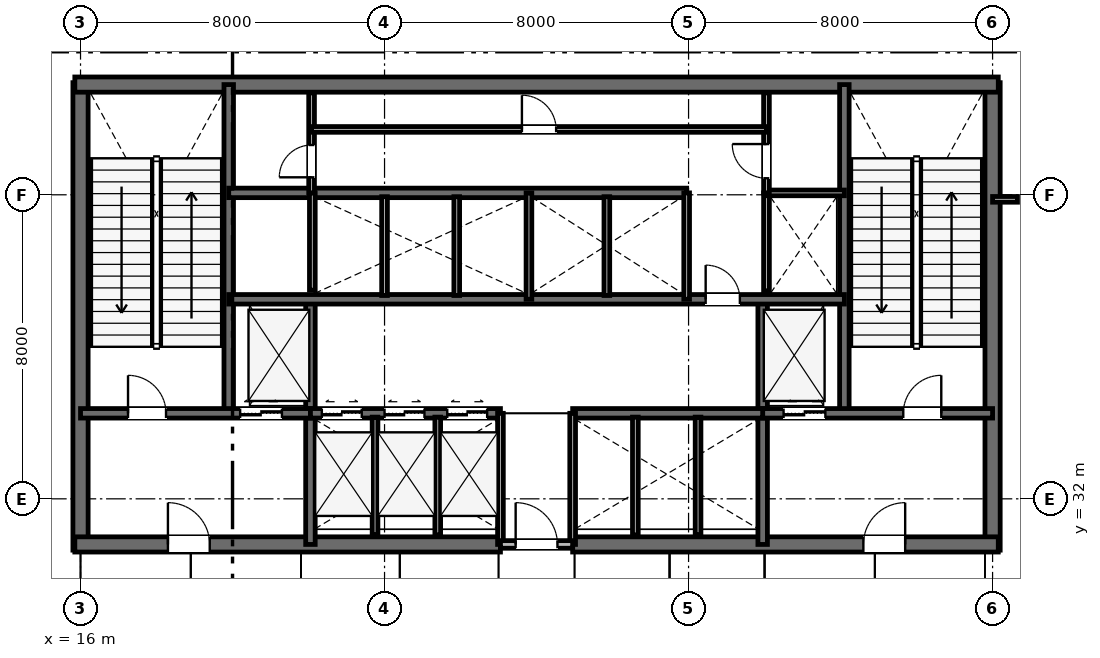
"""IFC4 building model, lengths in metres.
Left out: names, types, materials, properties, quantities, classifications, styles, units other than length and angle.
Written with IfcOpenShell. Run it as: python <this file> out.ifc"""

import sys

from ifc_helpers import new_model, si_unit, direction, frame, frame_2d, origin, place, context, subcontext, project, spatial, rectangle, extrude, element, fill, save


model = new_model("IFC4")
c1 = context("Model", 3, precision=1e-05, world=origin(), true_north=direction((0.0, 1.0)))
c2 = subcontext(c1, "Body", "Model", "MODEL_VIEW")
j1 = project(units=[si_unit("LENGTHUNIT", "METRE"), si_unit("PLANEANGLEUNIT", "RADIAN")], contexts=[c1])
p1 = place(None, origin())
s1 = spatial("IfcSite", under=j1, at=p1, CompositionType="ELEMENT")
p2 = place(p1, origin())
s2 = spatial("IfcBuilding", under=s1, at=p2, CompositionType="ELEMENT")
p3 = place(p2, frame((0.0, 0.0, 15.9)))
s3 = spatial("IfcBuildingStorey", under=s2, at=p3, CompositionType="ELEMENT", Elevation=15.9)
for number, where, z_axis, x_axis in (
    (1, (16.0, 30.65, 0.0), (0.0, 0.0, 1.0), (0.0, 1.0, 0.0)),
    (2, (40.0, 30.65, 0.0), (0.0, 0.0, 1.0), (0.0, 1.0, 0.0)),
):
    element("IfcWall", number, at=place(p3, frame(where, z_axis=z_axis, x_axis=x_axis)), inside=s3, PredefinedType="SHEAR", context=c2, shape_type="SweptSolid", body=[
        extrude(rectangle(XDim=12.3, YDim=0.4, at=frame_2d((6.15, 0.0))), origin(), (0.0, 0.0, 1.0), 5.4),
    ])
p4 = place(p3, frame((15.85, 42.9, 0.0), z_axis=(0.0, 0.0, 1.0), x_axis=(1.0, 0.0, 0.0)))
e3 = element("IfcWall", 3, at=p4, inside=s3, PredefinedType="SHEAR", context=c2, shape_type="SweptSolid", body=[
    extrude(rectangle(XDim=24.3, YDim=0.4, at=frame_2d((12.15, 0.0))), origin(), (0.0, 0.0, 1.0), 5.4),
])
p5 = place(p3, frame((15.85, 30.8, 0.0), z_axis=(0.0, 0.0, 1.0), x_axis=(1.0, 0.0, 0.0)))
e4 = element("IfcWall", 4, at=p5, inside=s3, PredefinedType="SHEAR", context=c2, shape_type="SweptSolid", body=[
    extrude(rectangle(XDim=11.2, YDim=0.4, at=frame_2d((5.6, 0.0))), origin(), (0.0, 0.0, 1.0), 5.4),
])
p6 = place(p5, frame((2.45, 0.0, 0.0)))
e5 = element("IfcOpeningElement", 5, at=p6, cuts=e4, PredefinedType="OPENING", context=c2, shape_type="SweptSolid", body=[
    extrude(rectangle(XDim=1.1, YDim=2.15, at=frame_2d((0.55, 1.075))), frame((0.0, 0.21, 0.0), z_axis=(0.0, -1.0, 0.0), x_axis=(1.0, 0.0, 0.0)), (0.0, 0.0, 1.0), 0.42),
])
p7 = place(p3, frame((28.95, 30.8, 0.0), z_axis=(0.0, 0.0, 1.0), x_axis=(1.0, 0.0, 0.0)))
e6 = element("IfcWall", 6, at=p7, inside=s3, PredefinedType="SHEAR", context=c2, shape_type="SweptSolid", body=[
    extrude(rectangle(XDim=11.2, YDim=0.4, at=frame_2d((5.6, 0.0))), origin(), (0.0, 0.0, 1.0), 5.4),
])
p8 = place(p7, frame((7.65, 0.0, 0.0)))
e7 = element("IfcOpeningElement", 7, at=p8, cuts=e6, PredefinedType="OPENING", context=c2, shape_type="SweptSolid", body=[
    extrude(rectangle(XDim=1.1, YDim=2.15, at=frame_2d((0.55, 1.075))), frame((0.0, 0.21, 0.0), z_axis=(0.0, -1.0, 0.0), x_axis=(1.0, 0.0, 0.0)), (0.0, 0.0, 1.0), 0.42),
])
for number, where, z_axis, x_axis in (
    (8, (19.9, 34.25, 0.0), (0.0, 0.0, 1.0), (0.0, 1.0, 0.0)),
    (9, (36.1, 34.25, 0.0), (0.0, 0.0, 1.0), (0.0, 1.0, 0.0)),
):
    element("IfcWall", number, at=place(p3, frame(where, z_axis=z_axis, x_axis=x_axis)), inside=s3, PredefinedType="SHEAR", context=c2, shape_type="SweptSolid", body=[
        extrude(rectangle(XDim=8.65, YDim=0.25, at=frame_2d((4.325, 0.0))), origin(), (0.0, 0.0, 1.0), 5.4),
    ])
for number, where, z_axis, x_axis in (
    (10, (22.05, 30.8, 0.0), (0.0, 0.0, 1.0), (0.0, 1.0, 0.0)),
    (11, (33.95, 30.8, 0.0), (0.0, 0.0, 1.0), (0.0, 1.0, 0.0)),
):
    element("IfcWall", number, at=place(p3, frame(where, z_axis=z_axis, x_axis=x_axis)), inside=s3, PredefinedType="SHEAR", context=c2, shape_type="SweptSolid", body=[
        extrude(rectangle(XDim=6.45, YDim=0.25, at=frame_2d((3.225, 0.0))), origin(), (0.0, 0.0, 1.0), 5.4),
    ])
p9 = place(p3, frame((16.0, 34.25, 0.0), z_axis=(0.0, 0.0, 1.0), x_axis=(1.0, 0.0, 0.0)))
e12 = element("IfcWall", 12, at=p9, inside=s3, PredefinedType="SHEAR", context=c2, shape_type="SweptSolid", body=[
    extrude(rectangle(XDim=6.05, YDim=0.25, at=frame_2d((3.025, 0.0))), origin(), (0.0, 0.0, 1.0), 5.4),
])
p10 = place(p9, frame((1.25, 0.0, 0.0)))
e13 = element("IfcOpeningElement", 13, at=p10, cuts=e12, PredefinedType="OPENING", context=c2, shape_type="SweptSolid", body=[
    extrude(rectangle(XDim=1.0, YDim=2.15, at=frame_2d((0.5, 1.075))), frame((0.0, 0.135, 0.0), z_axis=(0.0, -1.0, 0.0), x_axis=(1.0, 0.0, 0.0)), (0.0, 0.0, 1.0), 0.27),
])
p11 = place(p9, frame((4.2, 0.0, 0.0)))
e14 = element("IfcOpeningElement", 14, at=p11, cuts=e12, PredefinedType="OPENING", context=c2, shape_type="SweptSolid", body=[
    extrude(rectangle(XDim=1.1, YDim=2.15, at=frame_2d((0.55, 1.075))), frame((0.0, 0.135, 0.0), z_axis=(0.0, -1.0, 0.0), x_axis=(1.0, 0.0, 0.0)), (0.0, 0.0, 1.0), 0.27),
])
p12 = place(p3, frame((33.95, 34.25, 0.0), z_axis=(0.0, 0.0, 1.0), x_axis=(1.0, 0.0, 0.0)))
e15 = element("IfcWall", 15, at=p12, inside=s3, PredefinedType="SHEAR", context=c2, shape_type="SweptSolid", body=[
    extrude(rectangle(XDim=6.05, YDim=0.25, at=frame_2d((3.025, 0.0))), origin(), (0.0, 0.0, 1.0), 5.4),
])
p13 = place(p12, frame((3.7, 0.0, 0.0)))
e16 = element("IfcOpeningElement", 16, at=p13, cuts=e15, PredefinedType="OPENING", context=c2, shape_type="SweptSolid", body=[
    extrude(rectangle(XDim=1.0, YDim=2.15, at=frame_2d((0.5, 1.075))), frame((0.0, 0.135, 0.0), z_axis=(0.0, -1.0, 0.0), x_axis=(1.0, 0.0, 0.0)), (0.0, 0.0, 1.0), 0.27),
])
p14 = place(p12, frame((0.55, 0.0, 0.0)))
e17 = element("IfcOpeningElement", 17, at=p14, cuts=e15, PredefinedType="OPENING", context=c2, shape_type="SweptSolid", body=[
    extrude(rectangle(XDim=1.1, YDim=2.15, at=frame_2d((0.55, 1.075))), frame((0.0, 0.135, 0.0), z_axis=(0.0, -1.0, 0.0), x_axis=(1.0, 0.0, 0.0)), (0.0, 0.0, 1.0), 0.27),
])
p15 = place(p3, frame((22.05, 34.25, 0.0), z_axis=(0.0, 0.0, 1.0), x_axis=(1.0, 0.0, 0.0)))
e18 = element("IfcWall", 18, at=p15, inside=s3, PredefinedType="SHEAR", context=c2, shape_type="SweptSolid", body=[
    extrude(rectangle(XDim=5.0, YDim=0.25, at=frame_2d((2.5, 0.0))), origin(), (0.0, 0.0, 1.0), 5.4),
])
p16 = place(p15, frame((0.3, 0.0, 0.0)))
e19 = element("IfcOpeningElement", 19, at=p16, cuts=e18, PredefinedType="OPENING", context=c2, shape_type="SweptSolid", body=[
    extrude(rectangle(XDim=1.05, YDim=2.15, at=frame_2d((0.525, 1.075))), frame((0.0, 0.135, 0.0), z_axis=(0.0, -1.0, 0.0), x_axis=(1.0, 0.0, 0.0)), (0.0, 0.0, 1.0), 0.27),
])
p17 = place(p15, frame((1.95, 0.0, 0.0)))
e20 = element("IfcOpeningElement", 20, at=p17, cuts=e18, PredefinedType="OPENING", context=c2, shape_type="SweptSolid", body=[
    extrude(rectangle(XDim=1.05, YDim=2.15, at=frame_2d((0.525, 1.075))), frame((0.0, 0.135, 0.0), z_axis=(0.0, -1.0, 0.0), x_axis=(1.0, 0.0, 0.0)), (0.0, 0.0, 1.0), 0.27),
])
p18 = place(p15, frame((3.6, 0.0, 0.0)))
e21 = element("IfcOpeningElement", 21, at=p18, cuts=e18, PredefinedType="OPENING", context=c2, shape_type="SweptSolid", body=[
    extrude(rectangle(XDim=1.05, YDim=2.15, at=frame_2d((0.525, 1.075))), frame((0.0, 0.135, 0.0), z_axis=(0.0, -1.0, 0.0), x_axis=(1.0, 0.0, 0.0)), (0.0, 0.0, 1.0), 0.27),
])
p19 = place(p3, frame((28.95, 34.25, 0.0), z_axis=(0.0, 0.0, 1.0), x_axis=(1.0, 0.0, 0.0)))
e22 = element("IfcWall", 22, at=p19, inside=s3, PredefinedType="SHEAR", context=c2, shape_type="SweptSolid", body=[
    extrude(rectangle(XDim=5.0, YDim=0.25, at=frame_2d((2.5, 0.0))), origin(), (0.0, 0.0, 1.0), 5.4),
])
p20 = place(p3, frame((19.9, 37.25, 0.0), z_axis=(0.0, 0.0, 1.0), x_axis=(1.0, 0.0, 0.0)))
e23 = element("IfcWall", 23, at=p20, inside=s3, PredefinedType="SHEAR", context=c2, shape_type="SweptSolid", body=[
    extrude(rectangle(XDim=16.2, YDim=0.25, at=frame_2d((8.1, 0.0))), origin(), (0.0, 0.0, 1.0), 5.4),
])
p21 = place(p20, frame((12.55, 0.0, 0.0)))
e24 = element("IfcOpeningElement", 24, at=p21, cuts=e23, PredefinedType="OPENING", context=c2, shape_type="SweptSolid", body=[
    extrude(rectangle(XDim=0.9, YDim=2.15, at=frame_2d((0.45, 1.075))), frame((0.0, 0.135, 0.0), z_axis=(0.0, -1.0, 0.0), x_axis=(1.0, 0.0, 0.0)), (0.0, 0.0, 1.0), 0.27),
])
p22 = place(p3, frame((19.9, 40.05, 0.0), z_axis=(0.0, 0.0, 1.0), x_axis=(1.0, 0.0, 0.0)))
e25 = element("IfcWall", 25, at=p22, inside=s3, PredefinedType="SHEAR", context=c2, shape_type="SweptSolid", body=[
    extrude(rectangle(XDim=12.05, YDim=0.25, at=frame_2d((6.025, 0.0))), origin(), (0.0, 0.0, 1.0), 5.4),
])
for number, where, z_axis, x_axis in (
    (26, (27.05, 30.8, 0.0), (0.0, 0.0, 1.0), (0.0, 1.0, 0.0)),
    (27, (28.95, 30.8, 0.0), (0.0, 0.0, 1.0), (0.0, 1.0, 0.0)),
):
    element("IfcWall", number, at=place(p3, frame(where, z_axis=z_axis, x_axis=x_axis)), inside=s3, PredefinedType="PLUMBINGWALL", context=c2, shape_type="SweptSolid", body=[
        extrude(rectangle(XDim=3.45, YDim=0.15, at=frame_2d((1.725, 0.0))), origin(), (0.0, 0.0, 1.0), 4.64),
    ])
p23 = place(p3, frame((27.05, 30.8, 0.0), z_axis=(0.0, 0.0, 1.0), x_axis=(1.0, 0.0, 0.0)))
e28 = element("IfcWall", 28, at=p23, inside=s3, PredefinedType="PARTITIONING", context=c2, shape_type="SweptSolid", body=[
    extrude(rectangle(XDim=1.9, YDim=0.2, at=frame_2d((0.95, 0.0))), origin(), (0.0, 0.0, 1.0), 4.64),
])
p24 = place(p23, frame((0.4, 0.0, 0.0)))
e29 = element("IfcOpeningElement", 29, at=p24, cuts=e28, PredefinedType="OPENING", context=c2, shape_type="SweptSolid", body=[
    extrude(rectangle(XDim=1.1, YDim=2.15, at=frame_2d((0.55, 1.075))), frame((0.0, 0.11, 0.0), z_axis=(0.0, -1.0, 0.0), x_axis=(1.0, 0.0, 0.0)), (0.0, 0.0, 1.0), 0.22),
])
for number, where, z_axis, x_axis in (
    (30, (23.75, 31.05, 0.0), (0.0, 0.0, 1.0), (0.0, 1.0, 0.0)),
    (31, (25.4, 31.05, 0.0), (0.0, 0.0, 1.0), (0.0, 1.0, 0.0)),
    (32, (30.6, 31.05, 0.0), (0.0, 0.0, 1.0), (0.0, 1.0, 0.0)),
    (33, (32.25, 31.05, 0.0), (0.0, 0.0, 1.0), (0.0, 1.0, 0.0)),
):
    element("IfcWall", number, at=place(p3, frame(where, z_axis=z_axis, x_axis=x_axis)), inside=s3, PredefinedType="PLUMBINGWALL", context=c2, shape_type="SweptSolid", body=[
        extrude(rectangle(XDim=3.1, YDim=0.15, at=frame_2d((1.55, 0.0))), origin(), (0.0, 0.0, 1.0), 4.64),
    ])
p25 = place(p3, frame((22.1, 37.49, 0.0), z_axis=(0.0, 0.0, 1.0), x_axis=(0.0, 1.0, 0.0)))
e34 = element("IfcWall", 34, at=p25, inside=s3, PredefinedType="PLUMBINGWALL", context=c2, shape_type="SweptSolid", body=[
    extrude(rectangle(XDim=2.56, YDim=0.15, at=frame_2d((1.28, 0.0))), origin(), (0.0, 0.0, 1.0), 4.64),
])
p26 = place(p3, frame((27.8, 37.25, 0.0), z_axis=(0.0, 0.0, 1.0), x_axis=(0.0, 1.0, 0.0)))
e35 = element("IfcWall", 35, at=p26, inside=s3, PredefinedType="PLUMBINGWALL", context=c2, shape_type="SweptSolid", body=[
    extrude(rectangle(XDim=2.8, YDim=0.15, at=frame_2d((1.4, 0.0))), origin(), (0.0, 0.0, 1.0), 4.64),
])
for number, where, z_axis, x_axis in (
    (36, (24.0, 37.35, 0.0), (0.0, 0.0, 1.0), (0.0, 1.0, 0.0)),
    (37, (25.9, 37.35, 0.0), (0.0, 0.0, 1.0), (0.0, 1.0, 0.0)),
):
    element("IfcWall", number, at=place(p3, frame(where, z_axis=z_axis, x_axis=x_axis)), inside=s3, PredefinedType="PLUMBINGWALL", context=c2, shape_type="SweptSolid", body=[
        extrude(rectangle(XDim=2.6, YDim=0.15, at=frame_2d((1.3, 0.0))), origin(), (0.0, 0.0, 1.0), 4.64),
    ])
p27 = place(p3, frame((31.95, 37.25, 0.0), z_axis=(0.0, 0.0, 1.0), x_axis=(0.0, 1.0, 0.0)))
e38 = element("IfcWall", 38, at=p27, inside=s3, PredefinedType="PLUMBINGWALL", context=c2, shape_type="SweptSolid", body=[
    extrude(rectangle(XDim=2.8, YDim=0.15, at=frame_2d((1.4, 0.0))), origin(), (0.0, 0.0, 1.0), 4.64),
])
p28 = place(p3, frame((29.85, 37.35, 0.0), z_axis=(0.0, 0.0, 1.0), x_axis=(0.0, 1.0, 0.0)))
e39 = element("IfcWall", 39, at=p28, inside=s3, PredefinedType="PLUMBINGWALL", context=c2, shape_type="SweptSolid", body=[
    extrude(rectangle(XDim=2.6, YDim=0.15, at=frame_2d((1.3, 0.0))), origin(), (0.0, 0.0, 1.0), 4.64),
])
p29 = place(p3, frame((34.05, 37.473, 0.0), z_axis=(0.0, 0.0, 1.0), x_axis=(0.0, 1.0, 0.0)))
e40 = element("IfcWall", 40, at=p29, inside=s3, PredefinedType="PLUMBINGWALL", context=c2, shape_type="SweptSolid", body=[
    extrude(rectangle(XDim=2.577, YDim=0.15, at=frame_2d((1.288, 0.0))), origin(), (0.0, 0.0, 1.0), 4.64),
])
p30 = place(p3, frame((34.05, 40.05, 0.0), z_axis=(0.0, 0.0, 1.0), x_axis=(1.0, 0.0, 0.0)))
e41 = element("IfcWall", 41, at=p30, inside=s3, PredefinedType="PARTITIONING", context=c2, shape_type="SweptSolid", body=[
    extrude(rectangle(XDim=2.05, YDim=0.15, at=frame_2d((1.025, 0.0))), origin(), (0.0, 0.0, 1.0), 4.64),
])
p31 = place(p3, frame((34.05, 40.05, 0.0), z_axis=(0.0, 0.0, 1.0), x_axis=(0.0, 1.0, 0.0)))
e42 = element("IfcWall", 42, at=p31, inside=s3, PredefinedType="PARTITIONING", context=c2, shape_type="SweptSolid", body=[
    extrude(rectangle(XDim=2.63, YDim=0.15, at=frame_2d((1.315, 0.0))), origin(), (0.0, 0.0, 1.0), 4.64),
])
p32 = place(p31, frame((0.385, 0.0, 0.0)))
e43 = element("IfcOpeningElement", 43, at=p32, cuts=e42, PredefinedType="OPENING", context=c2, shape_type="SweptSolid", body=[
    extrude(rectangle(XDim=0.9, YDim=2.15, at=frame_2d((0.45, 1.075))), frame((0.0, 0.085, 0.0), z_axis=(0.0, -1.0, 0.0), x_axis=(1.0, 0.0, 0.0)), (0.0, 0.0, 1.0), 0.17),
])
p33 = place(p3, frame((22.08, 40.05, 0.0), z_axis=(0.0, 0.0, 1.0), x_axis=(0.0, 1.0, 0.0)))
e44 = element("IfcWall", 44, at=p33, inside=s3, PredefinedType="PARTITIONING", context=c2, shape_type="SweptSolid", body=[
    extrude(rectangle(XDim=2.63, YDim=0.15, at=frame_2d((1.315, 0.0))), origin(), (0.0, 0.0, 1.0), 4.64),
])
p34 = place(p33, frame((0.41, 0.0, 0.0)))
e45 = element("IfcOpeningElement", 45, at=p34, cuts=e44, PredefinedType="OPENING", context=c2, shape_type="SweptSolid", body=[
    extrude(rectangle(XDim=0.85, YDim=2.15, at=frame_2d((0.425, 1.075))), frame((0.0, 0.085, 0.0), z_axis=(0.0, -1.0, 0.0), x_axis=(1.0, 0.0, 0.0)), (0.0, 0.0, 1.0), 0.17),
])
p35 = place(p3, frame((22.08, 41.72, 0.0), z_axis=(0.0, 0.0, 1.0), x_axis=(1.0, 0.0, 0.0)))
e46 = element("IfcWall", 46, at=p35, inside=s3, PredefinedType="PARTITIONING", context=c2, shape_type="SweptSolid", body=[
    extrude(rectangle(XDim=11.97, YDim=0.15, at=frame_2d((5.985, 0.0))), origin(), (0.0, 0.0, 1.0), 4.64),
])
p36 = place(p35, frame((5.535, 0.0, 0.0)))
e47 = element("IfcOpeningElement", 47, at=p36, cuts=e46, PredefinedType="OPENING", context=c2, shape_type="SweptSolid", body=[
    extrude(rectangle(XDim=0.9, YDim=2.15, at=frame_2d((0.45, 1.075))), frame((0.0, 0.085, 0.0), z_axis=(0.0, -1.0, 0.0), x_axis=(1.0, 0.0, 0.0)), (0.0, 0.0, 1.0), 0.17),
])
p37 = place(p3, frame((40.0, 39.88, 0.0), z_axis=(0.0, 0.0, 1.0), x_axis=(1.0, 0.0, 0.0)))
e48 = element("IfcWall", 48, at=p37, inside=s3, PredefinedType="PARTITIONING", context=c2, shape_type="SweptSolid", body=[
    extrude(rectangle(XDim=0.655, YDim=0.15, at=frame_2d((0.328, 0.0))), origin(), (0.0, 0.0, 1.0), 2.98),
])
p38 = place(p24, origin())
e49 = element("IfcDoor", 49, at=p38, inside=s3, OperationType="SINGLE_SWING_LEFT", PredefinedType="DOOR", context=c2, shape_type="SweptSolid", body=[
    extrude(rectangle(XDim=1.1, YDim=2.15, at=frame_2d((0.55, 1.075))), frame((0.0, 0.025, 0.0), z_axis=(0.0, -1.0, 0.0), x_axis=(1.0, 0.0, 0.0)), (0.0, 0.0, 1.0), 0.05),
])
fill(e29, e49)
p39 = place(p10, origin())
e50 = element("IfcDoor", 50, at=p39, inside=s3, OperationType="SINGLE_SWING_LEFT", PredefinedType="DOOR", context=c2, shape_type="SweptSolid", body=[
    extrude(rectangle(XDim=1.0, YDim=2.15, at=frame_2d((0.5, 1.075))), frame((0.0, 0.025, 0.0), z_axis=(0.0, -1.0, 0.0), x_axis=(1.0, 0.0, 0.0)), (0.0, 0.0, 1.0), 0.05),
])
fill(e13, e50)
p40 = place(p13, origin())
e51 = element("IfcDoor", 51, at=p40, inside=s3, OperationType="SINGLE_SWING_RIGHT", PredefinedType="DOOR", context=c2, shape_type="SweptSolid", body=[
    extrude(rectangle(XDim=1.0, YDim=2.15, at=frame_2d((0.5, 1.075))), frame((0.0, 0.025, 0.0), z_axis=(0.0, -1.0, 0.0), x_axis=(1.0, 0.0, 0.0)), (0.0, 0.0, 1.0), 0.05),
])
fill(e16, e51)
p41 = place(p6, origin())
e52 = element("IfcDoor", 52, at=p41, inside=s3, OperationType="SINGLE_SWING_LEFT", PredefinedType="DOOR", context=c2, shape_type="SweptSolid", body=[
    extrude(rectangle(XDim=1.1, YDim=2.15, at=frame_2d((0.55, 1.075))), frame((0.0, 0.025, 0.0), z_axis=(0.0, -1.0, 0.0), x_axis=(1.0, 0.0, 0.0)), (0.0, 0.0, 1.0), 0.05),
])
fill(e5, e52)
p42 = place(p8, origin())
e53 = element("IfcDoor", 53, at=p42, inside=s3, OperationType="SINGLE_SWING_RIGHT", PredefinedType="DOOR", context=c2, shape_type="SweptSolid", body=[
    extrude(rectangle(XDim=1.1, YDim=2.15, at=frame_2d((0.55, 1.075))), frame((0.0, 0.025, 0.0), z_axis=(0.0, -1.0, 0.0), x_axis=(1.0, 0.0, 0.0)), (0.0, 0.0, 1.0), 0.05),
])
fill(e7, e53)
p43 = place(p21, origin())
e54 = element("IfcDoor", 54, at=p43, inside=s3, OperationType="SINGLE_SWING_LEFT", PredefinedType="DOOR", context=c2, shape_type="SweptSolid", body=[
    extrude(rectangle(XDim=0.9, YDim=2.15, at=frame_2d((0.45, 1.075))), frame((0.0, 0.025, 0.0), z_axis=(0.0, -1.0, 0.0), x_axis=(1.0, 0.0, 0.0)), (0.0, 0.0, 1.0), 0.05),
])
fill(e24, e54)
p44 = place(p32, origin())
e55 = element("IfcDoor", 55, at=p44, inside=s3, OperationType="SINGLE_SWING_RIGHT", PredefinedType="DOOR", context=c2, shape_type="SweptSolid", body=[
    extrude(rectangle(XDim=0.9, YDim=2.15, at=frame_2d((0.45, 1.075))), frame((0.0, 0.025, 0.0), z_axis=(0.0, -1.0, 0.0), x_axis=(1.0, 0.0, 0.0)), (0.0, 0.0, 1.0), 0.05),
])
fill(e43, e55)
p45 = place(p34, origin())
e56 = element("IfcDoor", 56, at=p45, inside=s3, OperationType="SINGLE_SWING_LEFT", PredefinedType="DOOR", context=c2, shape_type="SweptSolid", body=[
    extrude(rectangle(XDim=0.85, YDim=2.15, at=frame_2d((0.425, 1.075))), frame((0.0, 0.025, 0.0), z_axis=(0.0, -1.0, 0.0), x_axis=(1.0, 0.0, 0.0)), (0.0, 0.0, 1.0), 0.05),
])
fill(e45, e56)
p46 = place(p36, origin())
e57 = element("IfcDoor", 57, at=p46, inside=s3, OperationType="SINGLE_SWING_LEFT", PredefinedType="DOOR", context=c2, shape_type="SweptSolid", body=[
    extrude(rectangle(XDim=0.9, YDim=2.15, at=frame_2d((0.45, 1.075))), frame((0.0, 0.025, 0.0), z_axis=(0.0, -1.0, 0.0), x_axis=(1.0, 0.0, 0.0)), (0.0, 0.0, 1.0), 0.05),
])
fill(e47, e57)
p47 = place(p11, origin())
e58 = element("IfcDoor", 58, at=p47, inside=s3, OperationType="DOUBLE_DOOR_SLIDING", PredefinedType="DOOR", context=c2, shape_type="SweptSolid", body=[
    extrude(rectangle(XDim=1.1, YDim=2.15, at=frame_2d((0.55, 1.075))), frame((0.0, 0.025, 0.0), z_axis=(0.0, -1.0, 0.0), x_axis=(1.0, 0.0, 0.0)), (0.0, 0.0, 1.0), 0.05),
])
fill(e14, e58)
p48 = place(p14, origin())
e59 = element("IfcDoor", 59, at=p48, inside=s3, OperationType="DOUBLE_DOOR_SLIDING", PredefinedType="DOOR", context=c2, shape_type="SweptSolid", body=[
    extrude(rectangle(XDim=1.1, YDim=2.15, at=frame_2d((0.55, 1.075))), frame((0.0, 0.025, 0.0), z_axis=(0.0, -1.0, 0.0), x_axis=(1.0, 0.0, 0.0)), (0.0, 0.0, 1.0), 0.05),
])
fill(e17, e59)
p49 = place(p16, origin())
e60 = element("IfcDoor", 60, at=p49, inside=s3, OperationType="DOUBLE_DOOR_SLIDING", PredefinedType="DOOR", context=c2, shape_type="SweptSolid", body=[
    extrude(rectangle(XDim=1.05, YDim=2.15, at=frame_2d((0.525, 1.075))), frame((0.0, 0.025, 0.0), z_axis=(0.0, -1.0, 0.0), x_axis=(1.0, 0.0, 0.0)), (0.0, 0.0, 1.0), 0.05),
])
fill(e19, e60)
p50 = place(p17, origin())
e61 = element("IfcDoor", 61, at=p50, inside=s3, OperationType="DOUBLE_DOOR_SLIDING", PredefinedType="DOOR", context=c2, shape_type="SweptSolid", body=[
    extrude(rectangle(XDim=1.05, YDim=2.15, at=frame_2d((0.525, 1.075))), frame((0.0, 0.025, 0.0), z_axis=(0.0, -1.0, 0.0), x_axis=(1.0, 0.0, 0.0)), (0.0, 0.0, 1.0), 0.05),
])
fill(e20, e61)
p51 = place(p18, origin())
e62 = element("IfcDoor", 62, at=p51, inside=s3, OperationType="DOUBLE_DOOR_SLIDING", PredefinedType="DOOR", context=c2, shape_type="SweptSolid", body=[
    extrude(rectangle(XDim=1.05, YDim=2.15, at=frame_2d((0.525, 1.075))), frame((0.0, 0.025, 0.0), z_axis=(0.0, -1.0, 0.0), x_axis=(1.0, 0.0, 0.0)), (0.0, 0.0, 1.0), 0.05),
])
fill(e21, e62)
save(model, sys.argv[1])
